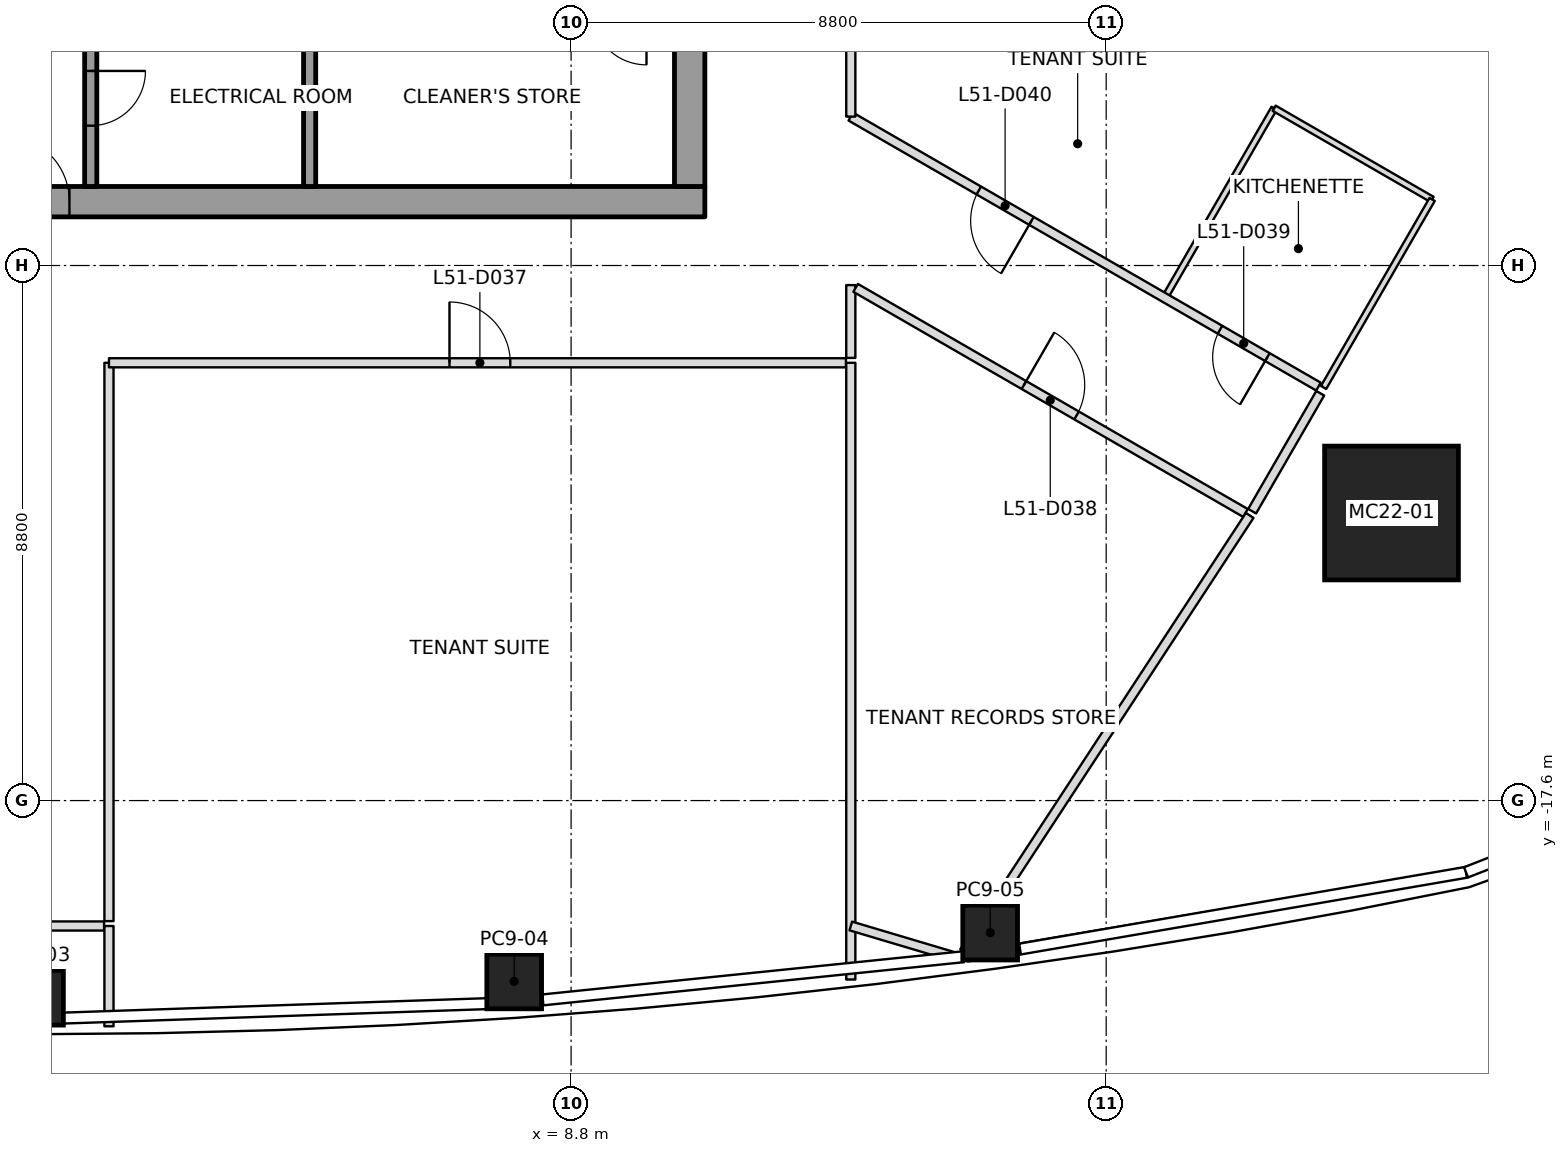
"""IFC4 building model, lengths in metres.
Left out: names, types, materials, properties, quantities, classifications, styles, units other than length and angle.
Written with IfcOpenShell. Run it as: python <this file> out.ifc"""

import sys

from ifc_helpers import new_model, si_unit, direction, frame, frame_2d, origin, origin_2d, place, context, subcontext, project, spatial, rectangle, extrude, element, fill, save


model = new_model("IFC4")
c1 = context("Model", 3, precision=1e-05, world=origin(), true_north=direction((0.0, 1.0)))
c2 = subcontext(c1, "Body", "Model", "MODEL_VIEW")
j1 = project(units=[si_unit("LENGTHUNIT", "METRE"), si_unit("PLANEANGLEUNIT", "RADIAN")], contexts=[c1])
p1 = place(None, origin())
s1 = spatial("IfcSite", under=j1, at=p1, CompositionType="ELEMENT")
p2 = place(p1, origin())
s2 = spatial("IfcBuilding", under=s1, at=p2, CompositionType="ELEMENT")
p3 = place(p2, frame((0.0, 0.0, 231.0)))
s3 = spatial("IfcBuildingStorey", under=s2, at=p3, CompositionType="ELEMENT", Elevation=231.0)
p4 = place(p3, frame((22.292, -12.871, 0.0), z_axis=(-0.027878605886, 0.016104927689, 0.999481572936), x_axis=(0.999611316129, 0.000449157512, 0.02787498742)))
e1 = element("IfcColumn", 1, at=p4, inside=s3, PredefinedType="COLUMN", context=c2, shape_type="SweptSolid", body=[
    extrude(rectangle(XDim=2.2, YDim=2.2, at=origin_2d()), origin(), (0.0, 0.0, 1.0), 4.002),
])
p5 = place(p3, frame((0.0, -20.843, 0.0), z_axis=(0.0, 0.011473854038, 0.99993417317), x_axis=(1.0, 0.0, 0.0)))
e2 = element("IfcColumn", 2, at=p5, inside=s3, PredefinedType="COLUMN", context=c2, shape_type="SweptSolid", body=[
    extrude(rectangle(XDim=0.9, YDim=0.9, at=origin_2d()), origin(), (0.0, 0.0, 1.0), 4.0),
])
p6 = place(p3, frame((7.864, -20.575, 0.0), z_axis=(-0.008788174922, 0.01116830563, 0.999899013366), x_axis=(0.997640525567, 0.068185585075, 0.008006730567)))
e3 = element("IfcColumn", 3, at=p6, inside=s3, PredefinedType="COLUMN", context=c2, shape_type="SweptSolid", body=[
    extrude(rectangle(XDim=0.9, YDim=0.9, at=origin_2d()), origin(), (0.0, 0.0, 1.0), 4.0),
])
p7 = place(p3, frame((15.692, -19.772, 0.0), z_axis=(-0.017574453011, 0.010434831475, 0.999791104628), x_axis=(0.990574210989, 0.13604032423, 0.015992582844)))
e4 = element("IfcColumn", 4, at=p7, inside=s3, PredefinedType="COLUMN", context=c2, shape_type="SweptSolid", body=[
    extrude(rectangle(XDim=0.9, YDim=0.9, at=origin_2d()), origin(), (0.0, 0.0, 1.0), 4.001),
])
p8 = place(p3, frame((-11.0, -7.75, 0.0), z_axis=(0.0, 0.0, 1.0), x_axis=(1.0, 0.0, 0.0)))
e5 = element("IfcWall", 5, at=p8, inside=s3, PredefinedType="SHEAR", context=c2, shape_type="SweptSolid", body=[
    extrude(rectangle(XDim=22.0, YDim=0.5, at=frame_2d((11.0, 0.0))), origin(), (0.0, 0.0, 1.0), 4.0),
])
p9 = place(p8, frame((10.45, 0.0, 0.0)))
e6 = element("IfcOpeningElement", 6, at=p9, cuts=e5, PredefinedType="OPENING", context=c2, shape_type="SweptSolid", body=[
    extrude(rectangle(XDim=1.1, YDim=2.1, at=frame_2d((0.55, 1.05))), frame((0.0, 0.25, 0.0), z_axis=(0.0, -1.0, 0.0), x_axis=(1.0, 0.0, 0.0)), (0.0, 0.0, 1.0), 0.5),
])
p10 = place(p3, frame((10.75, -7.5, 0.0), z_axis=(0.0, 0.0, 1.0), x_axis=(0.0, 1.0, 0.0)))
e7 = element("IfcWall", 7, at=p10, inside=s3, PredefinedType="SHEAR", context=c2, shape_type="SweptSolid", body=[
    extrude(rectangle(XDim=15.0, YDim=0.5, at=frame_2d((7.5, 0.0))), origin(), (0.0, 0.0, 1.0), 4.0),
])
p11 = place(p10, frame((6.6, 0.0, 0.0)))
e8 = element("IfcOpeningElement", 8, at=p11, cuts=e7, PredefinedType="OPENING", context=c2, shape_type="SweptSolid", body=[
    extrude(rectangle(XDim=1.8, YDim=2.1, at=frame_2d((0.9, 1.05))), frame((0.0, 0.25, 0.0), z_axis=(0.0, -1.0, 0.0), x_axis=(1.0, 0.0, 0.0)), (0.0, 0.0, 1.0), 0.5),
])
p12 = place(p3, frame((0.9, -4.6, 0.0), z_axis=(0.0, 0.0, 1.0), x_axis=(0.0, -1.0, 0.0)))
e9 = element("IfcWall", 9, at=p12, inside=s3, PredefinedType="SOLIDWALL", context=c2, shape_type="SweptSolid", body=[
    extrude(rectangle(XDim=2.9, YDim=0.2, at=frame_2d((1.45, 0.0))), origin(), (0.0, 0.0, 1.0), 3.85),
])
p13 = place(p12, frame((1.0, 0.0, 0.0)))
e10 = element("IfcOpeningElement", 10, at=p13, cuts=e9, PredefinedType="OPENING", context=c2, shape_type="SweptSolid", body=[
    extrude(rectangle(XDim=0.9, YDim=2.1, at=frame_2d((0.45, 1.05))), frame((0.0, 0.1, 0.0), z_axis=(0.0, -1.0, 0.0), x_axis=(1.0, 0.0, 0.0)), (0.0, 0.0, 1.0), 0.2),
])
p14 = place(p3, frame((4.5, -4.6, 0.0), z_axis=(0.0, 0.0, 1.0), x_axis=(0.0, -1.0, 0.0)))
e11 = element("IfcWall", 11, at=p14, inside=s3, PredefinedType="SOLIDWALL", context=c2, shape_type="SweptSolid", body=[
    extrude(rectangle(XDim=2.9, YDim=0.2, at=frame_2d((1.45, 0.0))), origin(), (0.0, 0.0, 1.0), 3.85),
])
p15 = place(p3, frame((1.2, -19.663, 0.0), z_axis=(0.0, 0.0, 1.0), x_axis=(0.0, -1.0, 0.0)))
e12 = element("IfcWall", 12, at=p15, inside=s3, PredefinedType="PARTITIONING", context=c2, shape_type="SweptSolid", body=[
    extrude(rectangle(XDim=1.65, YDim=0.15, at=frame_2d((0.825, 0.0))), origin(), (0.0, 0.0, 1.0), 3.234),
])
p16 = place(p3, frame((13.4, -10.4, 0.0), z_axis=(0.0, 0.0, 1.0), x_axis=(0.0, -1.0, 0.0)))
e13 = element("IfcWall", 13, at=p16, inside=s3, PredefinedType="PARTITIONING", context=c2, shape_type="SweptSolid", body=[
    extrude(rectangle(XDim=10.144, YDim=0.15, at=frame_2d((5.072, 0.0))), origin(), (0.0, 0.0, 1.0), 3.234),
])
p17 = place(p3, frame((13.4, -19.663, 0.0), z_axis=(0.0, 0.0, 1.0), x_axis=(0.958455635455, -0.285241642935, 0.0)))
e14 = element("IfcWall", 14, at=p17, inside=s3, PredefinedType="PARTITIONING", context=c2, shape_type="SweptSolid", body=[
    extrude(rectangle(XDim=1.787, YDim=0.15, at=frame_2d((0.894, 0.0))), origin(), (0.0, 0.0, 1.0), 3.234),
])
p18 = place(p3, frame((15.313, -20.173, 0.0), z_axis=(0.0, 0.0, 1.0), x_axis=(0.9860457512, 0.16647455223, 0.0)))
e15 = element("IfcWall", 15, at=p18, inside=s3, PredefinedType="PARTITIONING", context=c2, shape_type="SweptSolid", body=[
    extrude(rectangle(XDim=4.501, YDim=0.15, at=frame_2d((2.25, 0.0))), origin(), (0.0, 0.0, 1.0), 3.45),
])
p19 = place(p3, frame((19.96, -12.91, 0.0), z_axis=(0.0, 0.0, 1.0), x_axis=(-0.547697942309, -0.836676140445, 0.0)))
e16 = element("IfcWall", 16, at=p19, inside=s3, PredefinedType="PARTITIONING", context=c2, shape_type="SweptSolid", body=[
    extrude(rectangle(XDim=8.577, YDim=0.15, at=frame_2d((4.289, 0.0))), origin(), (0.0, 0.0, 1.0), 3.45),
])
p20 = place(p3, frame((-1.12, -19.663, 0.0), z_axis=(0.0, 0.0, 1.0), x_axis=(1.0, 0.0, 0.0)))
e17 = element("IfcWall", 17, at=p20, inside=s3, PredefinedType="PARTITIONING", context=c2, shape_type="SweptSolid", body=[
    extrude(rectangle(XDim=2.24, YDim=0.15, at=frame_2d((1.12, 0.0))), origin(), (0.0, 0.0, 1.0), 3.45),
])
p21 = place(p3, frame((1.2, -19.583, 0.0), z_axis=(0.0, 0.0, 1.0), x_axis=(0.0, 1.0, 0.0)))
e18 = element("IfcWall", 18, at=p21, inside=s3, PredefinedType="PARTITIONING", context=c2, shape_type="SweptSolid", body=[
    extrude(rectangle(XDim=9.183, YDim=0.15, at=frame_2d((4.592, 0.0))), origin(), (0.0, 0.0, 1.0), 3.45),
])
p22 = place(p3, frame((1.2, -10.4, 0.0), z_axis=(0.0, 0.0, 1.0), x_axis=(1.0, 0.0, 0.0)))
e19 = element("IfcWall", 19, at=p22, inside=s3, PredefinedType="PARTITIONING", context=c2, shape_type="SweptSolid", body=[
    extrude(rectangle(XDim=12.12, YDim=0.15, at=frame_2d((6.06, 0.0))), origin(), (0.0, 0.0, 1.0), 3.317),
])
p23 = place(p22, frame((5.6, 0.0, 0.0)))
e20 = element("IfcOpeningElement", 20, at=p23, cuts=e19, PredefinedType="OPENING", context=c2, shape_type="SweptSolid", body=[
    extrude(rectangle(XDim=1.0, YDim=2.1, at=frame_2d((0.5, 1.05))), frame((0.0, 0.075, 0.0), z_axis=(0.0, -1.0, 0.0), x_axis=(1.0, 0.0, 0.0)), (0.0, 0.0, 1.0), 0.15),
])
p24 = place(p3, frame((13.4, -10.32, 0.0), z_axis=(0.0, 0.0, 1.0), x_axis=(0.0, 1.0, 0.0)))
e21 = element("IfcWall", 21, at=p24, inside=s3, PredefinedType="PARTITIONING", context=c2, shape_type="SweptSolid", body=[
    extrude(rectangle(XDim=1.198, YDim=0.15, at=frame_2d((0.599, 0.0))), origin(), (0.0, 0.0, 1.0), 3.233),
])
p25 = place(p3, frame((13.479, -9.168, 0.0), z_axis=(0.0, 0.0, 1.0), x_axis=(0.866024691562, -0.500001233604, 0.0)))
e22 = element("IfcWall", 22, at=p25, inside=s3, PredefinedType="PARTITIONING", context=c2, shape_type="SweptSolid", body=[
    extrude(rectangle(XDim=7.404, YDim=0.15, at=frame_2d((3.702, 0.0))), origin(), (0.0, 0.0, 1.0), 3.233),
])
p26 = place(p25, frame((3.196, 0.0, 0.0)))
e23 = element("IfcOpeningElement", 23, at=p26, cuts=e22, PredefinedType="OPENING", context=c2, shape_type="SweptSolid", body=[
    extrude(rectangle(XDim=1.0, YDim=2.1, at=frame_2d((0.5, 1.05))), frame((0.0, 0.075, 0.0), z_axis=(0.0, -1.0, 0.0), x_axis=(1.0, 0.0, 0.0)), (0.0, 0.0, 1.0), 0.15),
])
p27 = place(p3, frame((21.091, -10.791, 0.0), z_axis=(0.0, 0.0, 1.0), x_axis=(-0.866028564552, 0.499994525349, 0.0)))
e24 = element("IfcWall", 24, at=p27, inside=s3, PredefinedType="PARTITIONING", context=c2, shape_type="SweptSolid", body=[
    extrude(rectangle(XDim=8.881, YDim=0.15, at=frame_2d((4.44, 0.0))), origin(), (0.0, 0.0, 1.0), 3.317),
])
p28 = place(p27, frame((0.97, 0.0, 0.0)))
e25 = element("IfcOpeningElement", 25, at=p28, cuts=e24, PredefinedType="OPENING", context=c2, shape_type="SweptSolid", body=[
    extrude(rectangle(XDim=0.9, YDim=2.1, at=frame_2d((0.45, 1.05))), frame((0.0, 0.075, 0.0), z_axis=(0.0, -1.0, 0.0), x_axis=(1.0, 0.0, 0.0)), (0.0, 0.0, 1.0), 0.15),
])
p29 = place(p27, frame((5.45, 0.0, 0.0)))
e26 = element("IfcOpeningElement", 26, at=p29, cuts=e24, PredefinedType="OPENING", context=c2, shape_type="SweptSolid", body=[
    extrude(rectangle(XDim=1.0, YDim=2.1, at=frame_2d((0.5, 1.05))), frame((0.0, 0.075, 0.0), z_axis=(0.0, -1.0, 0.0), x_axis=(1.0, 0.0, 0.0)), (0.0, 0.0, 1.0), 0.15),
])
p30 = place(p3, frame((13.4, -6.351, 0.0), z_axis=(0.0, 0.0, 1.0), x_axis=(0.0, 1.0, 0.0)))
e27 = element("IfcWall", 27, at=p30, inside=s3, PredefinedType="PARTITIONING", context=c2, shape_type="SweptSolid", body=[
    extrude(rectangle(XDim=12.702, YDim=0.15, at=frame_2d((6.351, 0.0))), origin(), (0.0, 0.0, 1.0), 3.317),
])
p31 = place(p30, frame((7.952, 0.0, 0.0)))
e28 = element("IfcOpeningElement", 28, at=p31, cuts=e27, PredefinedType="OPENING", context=c2, shape_type="SweptSolid", body=[
    extrude(rectangle(XDim=1.0, YDim=2.1, at=frame_2d((0.5, 1.05))), frame((0.0, 0.075, 0.0), z_axis=(0.0, -1.0, 0.0), x_axis=(1.0, 0.0, 0.0)), (0.0, 0.0, 1.0), 0.15),
])
p32 = place(p3, frame((20.0, -12.841, 0.0), z_axis=(0.0, 0.0, 1.0), x_axis=(0.49994888933, 0.866054910533, 0.0)))
e29 = element("IfcWall", 29, at=p32, inside=s3, PredefinedType="PARTITIONING", context=c2, shape_type="SweptSolid", body=[
    extrude(rectangle(XDim=2.24, YDim=0.15, at=frame_2d((1.12, 0.0))), origin(), (0.0, 0.0, 1.0), 3.233),
])
p33 = place(p3, frame((18.577, -9.305, 0.0), z_axis=(0.0, 0.0, 1.0), x_axis=(0.499971082179, 0.866042098853, 0.0)))
e30 = element("IfcWall", 30, at=p33, inside=s3, PredefinedType="PARTITIONING", context=c2, shape_type="SweptSolid", body=[
    extrude(rectangle(XDim=3.57, YDim=0.1, at=frame_2d((1.785, 0.0))), origin(), (0.0, 0.0, 1.0), 3.45),
])
p34 = place(p3, frame((20.362, -6.214, 0.0), z_axis=(0.0, 0.0, 1.0), x_axis=(0.866031096941, -0.499990139034, 0.0)))
e31 = element("IfcWall", 31, at=p34, inside=s3, PredefinedType="PARTITIONING", context=c2, shape_type="SweptSolid", body=[
    extrude(rectangle(XDim=3.0, YDim=0.1, at=frame_2d((1.5, 0.0))), origin(), (0.0, 0.0, 1.0), 3.443),
])
p35 = place(p3, frame((22.96, -7.714, 0.0), z_axis=(0.0, 0.0, 1.0), x_axis=(-0.500022371132, -0.86601248742, 0.0)))
e32 = element("IfcWall", 32, at=p35, inside=s3, PredefinedType="PARTITIONING", context=c2, shape_type="SweptSolid", body=[
    extrude(rectangle(XDim=3.57, YDim=0.1, at=frame_2d((1.785, 0.0))), origin(), (0.0, 0.0, 1.0), 3.45),
])
p36 = place(p23, origin())
e33 = element("IfcDoor", 33, at=p36, inside=s3, OperationType="SINGLE_SWING_RIGHT", PredefinedType="DOOR", context=c2, shape_type="SweptSolid", body=[
    extrude(rectangle(XDim=1.0, YDim=2.1, at=frame_2d((0.5, 1.05))), frame((0.0, 0.025, 0.0), z_axis=(0.0, -1.0, 0.0), x_axis=(1.0, 0.0, 0.0)), (0.0, 0.0, 1.0), 0.05),
])
fill(e20, e33)
p37 = place(p26, origin())
e34 = element("IfcDoor", 34, at=p37, inside=s3, OperationType="SINGLE_SWING_LEFT", PredefinedType="DOOR", context=c2, shape_type="SweptSolid", body=[
    extrude(rectangle(XDim=1.0, YDim=2.1, at=frame_2d((0.5, 1.05))), frame((0.0, 0.025, 0.0), z_axis=(0.0, -1.0, 0.0), x_axis=(1.0, 0.0, 0.0)), (0.0, 0.0, 1.0), 0.05),
])
fill(e23, e34)
p38 = place(p28, origin())
e35 = element("IfcDoor", 35, at=p38, inside=s3, OperationType="SINGLE_SWING_LEFT", PredefinedType="DOOR", context=c2, shape_type="SweptSolid", body=[
    extrude(rectangle(XDim=0.9, YDim=2.1, at=frame_2d((0.45, 1.05))), frame((0.0, 0.025, 0.0), z_axis=(0.0, -1.0, 0.0), x_axis=(1.0, 0.0, 0.0)), (0.0, 0.0, 1.0), 0.05),
])
fill(e25, e35)
p39 = place(p29, origin())
e36 = element("IfcDoor", 36, at=p39, inside=s3, OperationType="SINGLE_SWING_LEFT", PredefinedType="DOOR", context=c2, shape_type="SweptSolid", body=[
    extrude(rectangle(XDim=1.0, YDim=2.1, at=frame_2d((0.5, 1.05))), frame((0.0, 0.025, 0.0), z_axis=(0.0, -1.0, 0.0), x_axis=(1.0, 0.0, 0.0)), (0.0, 0.0, 1.0), 0.05),
])
fill(e26, e36)
p40 = place(p13, origin())
e37 = element("IfcDoor", 37, at=p40, inside=s3, OperationType="SINGLE_SWING_RIGHT", PredefinedType="DOOR", context=c2, shape_type="SweptSolid", body=[
    extrude(rectangle(XDim=0.9, YDim=2.1, at=frame_2d((0.45, 1.05))), frame((0.0, 0.025, 0.0), z_axis=(0.0, -1.0, 0.0), x_axis=(1.0, 0.0, 0.0)), (0.0, 0.0, 1.0), 0.05),
])
fill(e10, e37)
p41 = place(p9, origin())
e38 = element("IfcDoor", 38, at=p41, inside=s3, OperationType="SINGLE_SWING_RIGHT", PredefinedType="DOOR", context=c2, shape_type="SweptSolid", body=[
    extrude(rectangle(XDim=1.1, YDim=2.1, at=frame_2d((0.55, 1.05))), frame((0.0, 0.025, 0.0), z_axis=(0.0, -1.0, 0.0), x_axis=(1.0, 0.0, 0.0)), (0.0, 0.0, 1.0), 0.05),
])
fill(e6, e38)
save(model, sys.argv[1])
